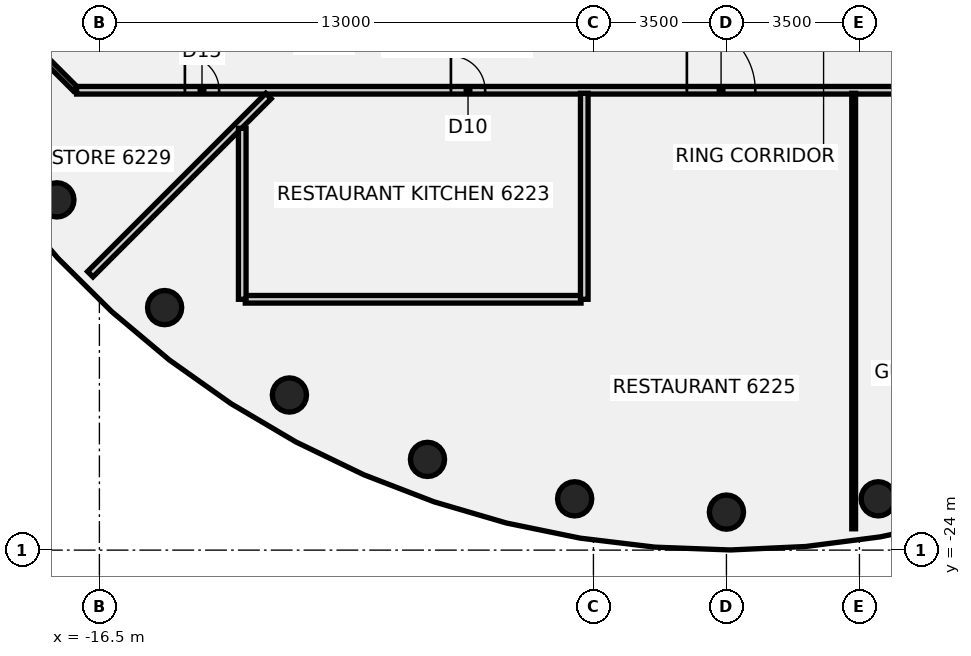
"""IFC4 building model, lengths in metres.
Left out: names, types, materials, properties, quantities, classifications, styles, units other than length and angle.
Written with IfcOpenShell. Run it as: python <this file> out.ifc"""

import sys

from ifc_helpers import new_model, si_unit, direction, frame, frame_2d, origin, origin_2d, place, context, subcontext, project, spatial, rectangle, circle, extrude, element, fill, save


model = new_model("IFC4")
c1 = context("Model", 3, precision=1e-05, world=origin(), true_north=direction((0.0, 1.0)))
c2 = subcontext(c1, "Body", "Model", "MODEL_VIEW")
j1 = project(units=[si_unit("LENGTHUNIT", "METRE"), si_unit("PLANEANGLEUNIT", "RADIAN")], contexts=[c1])
p1 = place(None, origin())
s1 = spatial("IfcSite", under=j1, at=p1, CompositionType="ELEMENT")
p2 = place(p1, origin())
s2 = spatial("IfcBuilding", under=s1, at=p2, CompositionType="ELEMENT")
p3 = place(p2, frame((0.0, 0.0, 245.1)))
s3 = spatial("IfcBuildingStorey", under=s2, at=p3, CompositionType="ELEMENT", Elevation=245.1)
for number, where, z_axis, x_axis in (
    (1, (-17.619, -14.784, -0.14), (0.0, 0.0, 1.0), (1.0, 0.0, 0.0)),
    (2, (-14.784, -17.619, -0.14), (0.0, 0.0, 1.0), (1.0, 0.0, 0.0)),
    (3, (-11.5, -19.919, -0.14), (0.0, 0.0, 1.0), (1.0, 0.0, 0.0)),
    (4, (-7.866, -21.613, -0.14), (0.0, 0.0, 1.0), (1.0, 0.0, 0.0)),
    (5, (-3.994, -22.651, -0.14), (0.0, 0.0, 1.0), (1.0, 0.0, 0.0)),
    (6, (0.0, -23.0, -0.14), (0.0, 0.0, 1.0), (1.0, 0.0, 0.0)),
    (7, (3.994, -22.651, -0.14), (0.0, 0.0, 1.0), (1.0, 0.0, 0.0)),
):
    element("IfcColumn", number, at=place(p3, frame(where, z_axis=z_axis, x_axis=x_axis)), inside=s3, PredefinedType="COLUMN", context=c2, shape_type="SweptSolid", body=[
        extrude(circle(Radius=0.45, at=origin_2d()), origin(), (0.0, 0.0, 1.0), 3.6),
    ])
p4 = place(p3, frame((-18.872, -10.128, 0.0), z_axis=(0.0, 0.0, 1.0), x_axis=(0.707106781187, -0.707106781187, 0.0)))
e8 = element("IfcWall", 8, at=p4, inside=s3, PredefinedType="PARTITIONING", context=c2, shape_type="SweptSolid", body=[
    extrude(rectangle(XDim=2.455, YDim=0.15, at=frame_2d((1.228, 0.0))), origin(), (0.0, 0.0, 1.0), 2.864),
])
p5 = place(p3, frame((-17.1, -11.9, 0.0), z_axis=(0.0, 0.0, 1.0), x_axis=(1.0, 0.0, 0.0)))
e9 = element("IfcWall", 9, at=p5, inside=s3, PredefinedType="PARTITIONING", context=c2, shape_type="SweptSolid", body=[
    extrude(rectangle(XDim=34.165, YDim=0.2, at=frame_2d((17.083, 0.0))), origin(), (0.0, 0.0, 1.0), 2.864),
])
p6 = place(p5, frame((9.85, 0.0, 0.0)))
e10 = element("IfcOpeningElement", 10, at=p6, cuts=e9, PredefinedType="OPENING", context=c2, shape_type="SweptSolid", body=[
    extrude(rectangle(XDim=0.9, YDim=2.1, at=frame_2d((0.45, 1.05))), frame((0.0, 0.11, 0.0), z_axis=(0.0, -1.0, 0.0), x_axis=(1.0, 0.0, 0.0)), (0.0, 0.0, 1.0), 0.22),
])
p7 = place(p5, frame((26.941, 0.0, 0.0)))
e11 = element("IfcOpeningElement", 11, at=p7, cuts=e9, PredefinedType="OPENING", context=c2, shape_type="SweptSolid", body=[
    extrude(rectangle(XDim=0.9, YDim=2.1, at=frame_2d((0.45, 1.05))), frame((0.0, 0.11, 0.0), z_axis=(0.0, -1.0, 0.0), x_axis=(1.0, 0.0, 0.0)), (0.0, 0.0, 1.0), 0.22),
])
p8 = place(p5, frame((16.059, 0.0, 0.0)))
e12 = element("IfcOpeningElement", 12, at=p8, cuts=e9, PredefinedType="OPENING", context=c2, shape_type="SweptSolid", body=[
    extrude(rectangle(XDim=1.8, YDim=2.1, at=frame_2d((0.9, 1.05))), frame((0.0, 0.11, 0.0), z_axis=(0.0, -1.0, 0.0), x_axis=(1.0, 0.0, 0.0)), (0.0, 0.0, 1.0), 0.22),
])
p9 = place(p5, frame((22.548, 0.0, 0.0)))
e13 = element("IfcOpeningElement", 13, at=p9, cuts=e9, PredefinedType="OPENING", context=c2, shape_type="SweptSolid", body=[
    extrude(rectangle(XDim=1.8, YDim=2.1, at=frame_2d((0.9, 1.05))), frame((0.0, 0.11, 0.0), z_axis=(0.0, -1.0, 0.0), x_axis=(1.0, 0.0, 0.0)), (0.0, 0.0, 1.0), 0.22),
])
p10 = place(p5, frame((31.7, 0.0, 0.0)))
e14 = element("IfcOpeningElement", 14, at=p10, cuts=e9, PredefinedType="OPENING", context=c2, shape_type="SweptSolid", body=[
    extrude(rectangle(XDim=0.9, YDim=2.1, at=frame_2d((0.45, 1.05))), frame((0.0, 0.11, 0.0), z_axis=(0.0, -1.0, 0.0), x_axis=(1.0, 0.0, 0.0)), (0.0, 0.0, 1.0), 0.22),
])
p11 = place(p5, frame((2.85, 0.0, 0.0)))
e15 = element("IfcOpeningElement", 15, at=p11, cuts=e9, PredefinedType="OPENING", context=c2, shape_type="SweptSolid", body=[
    extrude(rectangle(XDim=0.9, YDim=2.1, at=frame_2d((0.45, 1.05))), frame((0.0, 0.11, 0.0), z_axis=(0.0, -1.0, 0.0), x_axis=(1.0, 0.0, 0.0)), (0.0, 0.0, 1.0), 0.22),
])
p12 = place(p3, frame((-12.661, -17.4, 0.0), z_axis=(0.0, 0.0, 1.0), x_axis=(1.0, 0.0, 0.0)))
e16 = element("IfcWall", 16, at=p12, inside=s3, PredefinedType="PARTITIONING", context=c2, shape_type="SweptSolid", body=[
    extrude(rectangle(XDim=8.835, YDim=0.2, at=frame_2d((4.417, 0.0))), origin(), (0.0, 0.0, 1.0), 2.864),
])
p13 = place(p3, frame((-16.74, -16.74, 0.0), z_axis=(0.0, 0.0, 1.0), x_axis=(0.707106781187, 0.707106781187, 0.0)))
e17 = element("IfcWall", 17, at=p13, inside=s3, PredefinedType="PARTITIONING", context=c2, shape_type="SweptSolid", body=[
    extrude(rectangle(XDim=6.631, YDim=0.2, at=frame_2d((3.315, 0.0))), origin(), (0.0, 0.0, 1.0), 2.864),
])
p14 = place(p3, frame((-12.741, -17.4, 0.0), z_axis=(0.0, 0.0, 1.0), x_axis=(0.0, 1.0, 0.0)))
e18 = element("IfcWall", 18, at=p14, inside=s3, PredefinedType="PARTITIONING", context=c2, shape_type="SweptSolid", body=[
    extrude(rectangle(XDim=4.499, YDim=0.2, at=frame_2d((2.25, 0.0))), origin(), (0.0, 0.0, 1.0), 2.864),
])
p15 = place(p3, frame((-3.741, -17.4, 0.0), z_axis=(0.0, 0.0, 1.0), x_axis=(0.0, 1.0, 0.0)))
e19 = element("IfcWall", 19, at=p15, inside=s3, PredefinedType="PARTITIONING", context=c2, shape_type="SweptSolid", body=[
    extrude(rectangle(XDim=5.42, YDim=0.2, at=frame_2d((2.71, 0.0))), origin(), (0.0, 0.0, 1.0), 2.864),
])
p16 = place(p3, frame((3.348, -23.439, 0.0), z_axis=(0.0, 0.0, 1.0), x_axis=(0.0, 1.0, 0.0)))
e20 = element("IfcWall", 20, at=p16, inside=s3, PredefinedType="PARTITIONING", context=c2, shape_type="SweptSolid", body=[
    extrude(rectangle(XDim=11.459, YDim=0.1, at=frame_2d((5.729, 0.0))), origin(), (0.0, 0.0, 1.0), 2.864),
])
p17 = place(p6, frame((0.9, 0.0, 0.0), z_axis=(0.0, 0.0, 1.0), x_axis=(-1.0, 0.0, 0.0)))
e21 = element("IfcDoor", 21, at=p17, inside=s3, OperationType="SINGLE_SWING_LEFT", PredefinedType="DOOR", context=c2, shape_type="SweptSolid", body=[
    extrude(rectangle(XDim=0.9, YDim=2.1, at=frame_2d((0.45, 1.05))), frame((0.0, 0.025, 0.0), z_axis=(0.0, -1.0, 0.0), x_axis=(1.0, 0.0, 0.0)), (0.0, 0.0, 1.0), 0.05),
])
fill(e10, e21)
p18 = place(p8, origin())
e22 = element("IfcDoor", 22, at=p18, inside=s3, OperationType="DOUBLE_DOOR_SINGLE_SWING", PredefinedType="DOOR", context=c2, shape_type="SweptSolid", body=[
    extrude(rectangle(XDim=1.8, YDim=2.1, at=frame_2d((0.9, 1.05))), frame((0.0, 0.025, 0.0), z_axis=(0.0, -1.0, 0.0), x_axis=(1.0, 0.0, 0.0)), (0.0, 0.0, 1.0), 0.05),
])
fill(e12, e22)
p19 = place(p11, frame((0.9, 0.0, 0.0), z_axis=(0.0, 0.0, 1.0), x_axis=(-1.0, 0.0, 0.0)))
e23 = element("IfcDoor", 23, at=p19, inside=s3, OperationType="SINGLE_SWING_LEFT", PredefinedType="DOOR", context=c2, shape_type="SweptSolid", body=[
    extrude(rectangle(XDim=0.9, YDim=2.1, at=frame_2d((0.45, 1.05))), frame((0.0, 0.025, 0.0), z_axis=(0.0, -1.0, 0.0), x_axis=(1.0, 0.0, 0.0)), (0.0, 0.0, 1.0), 0.05),
])
fill(e15, e23)
save(model, sys.argv[1])
